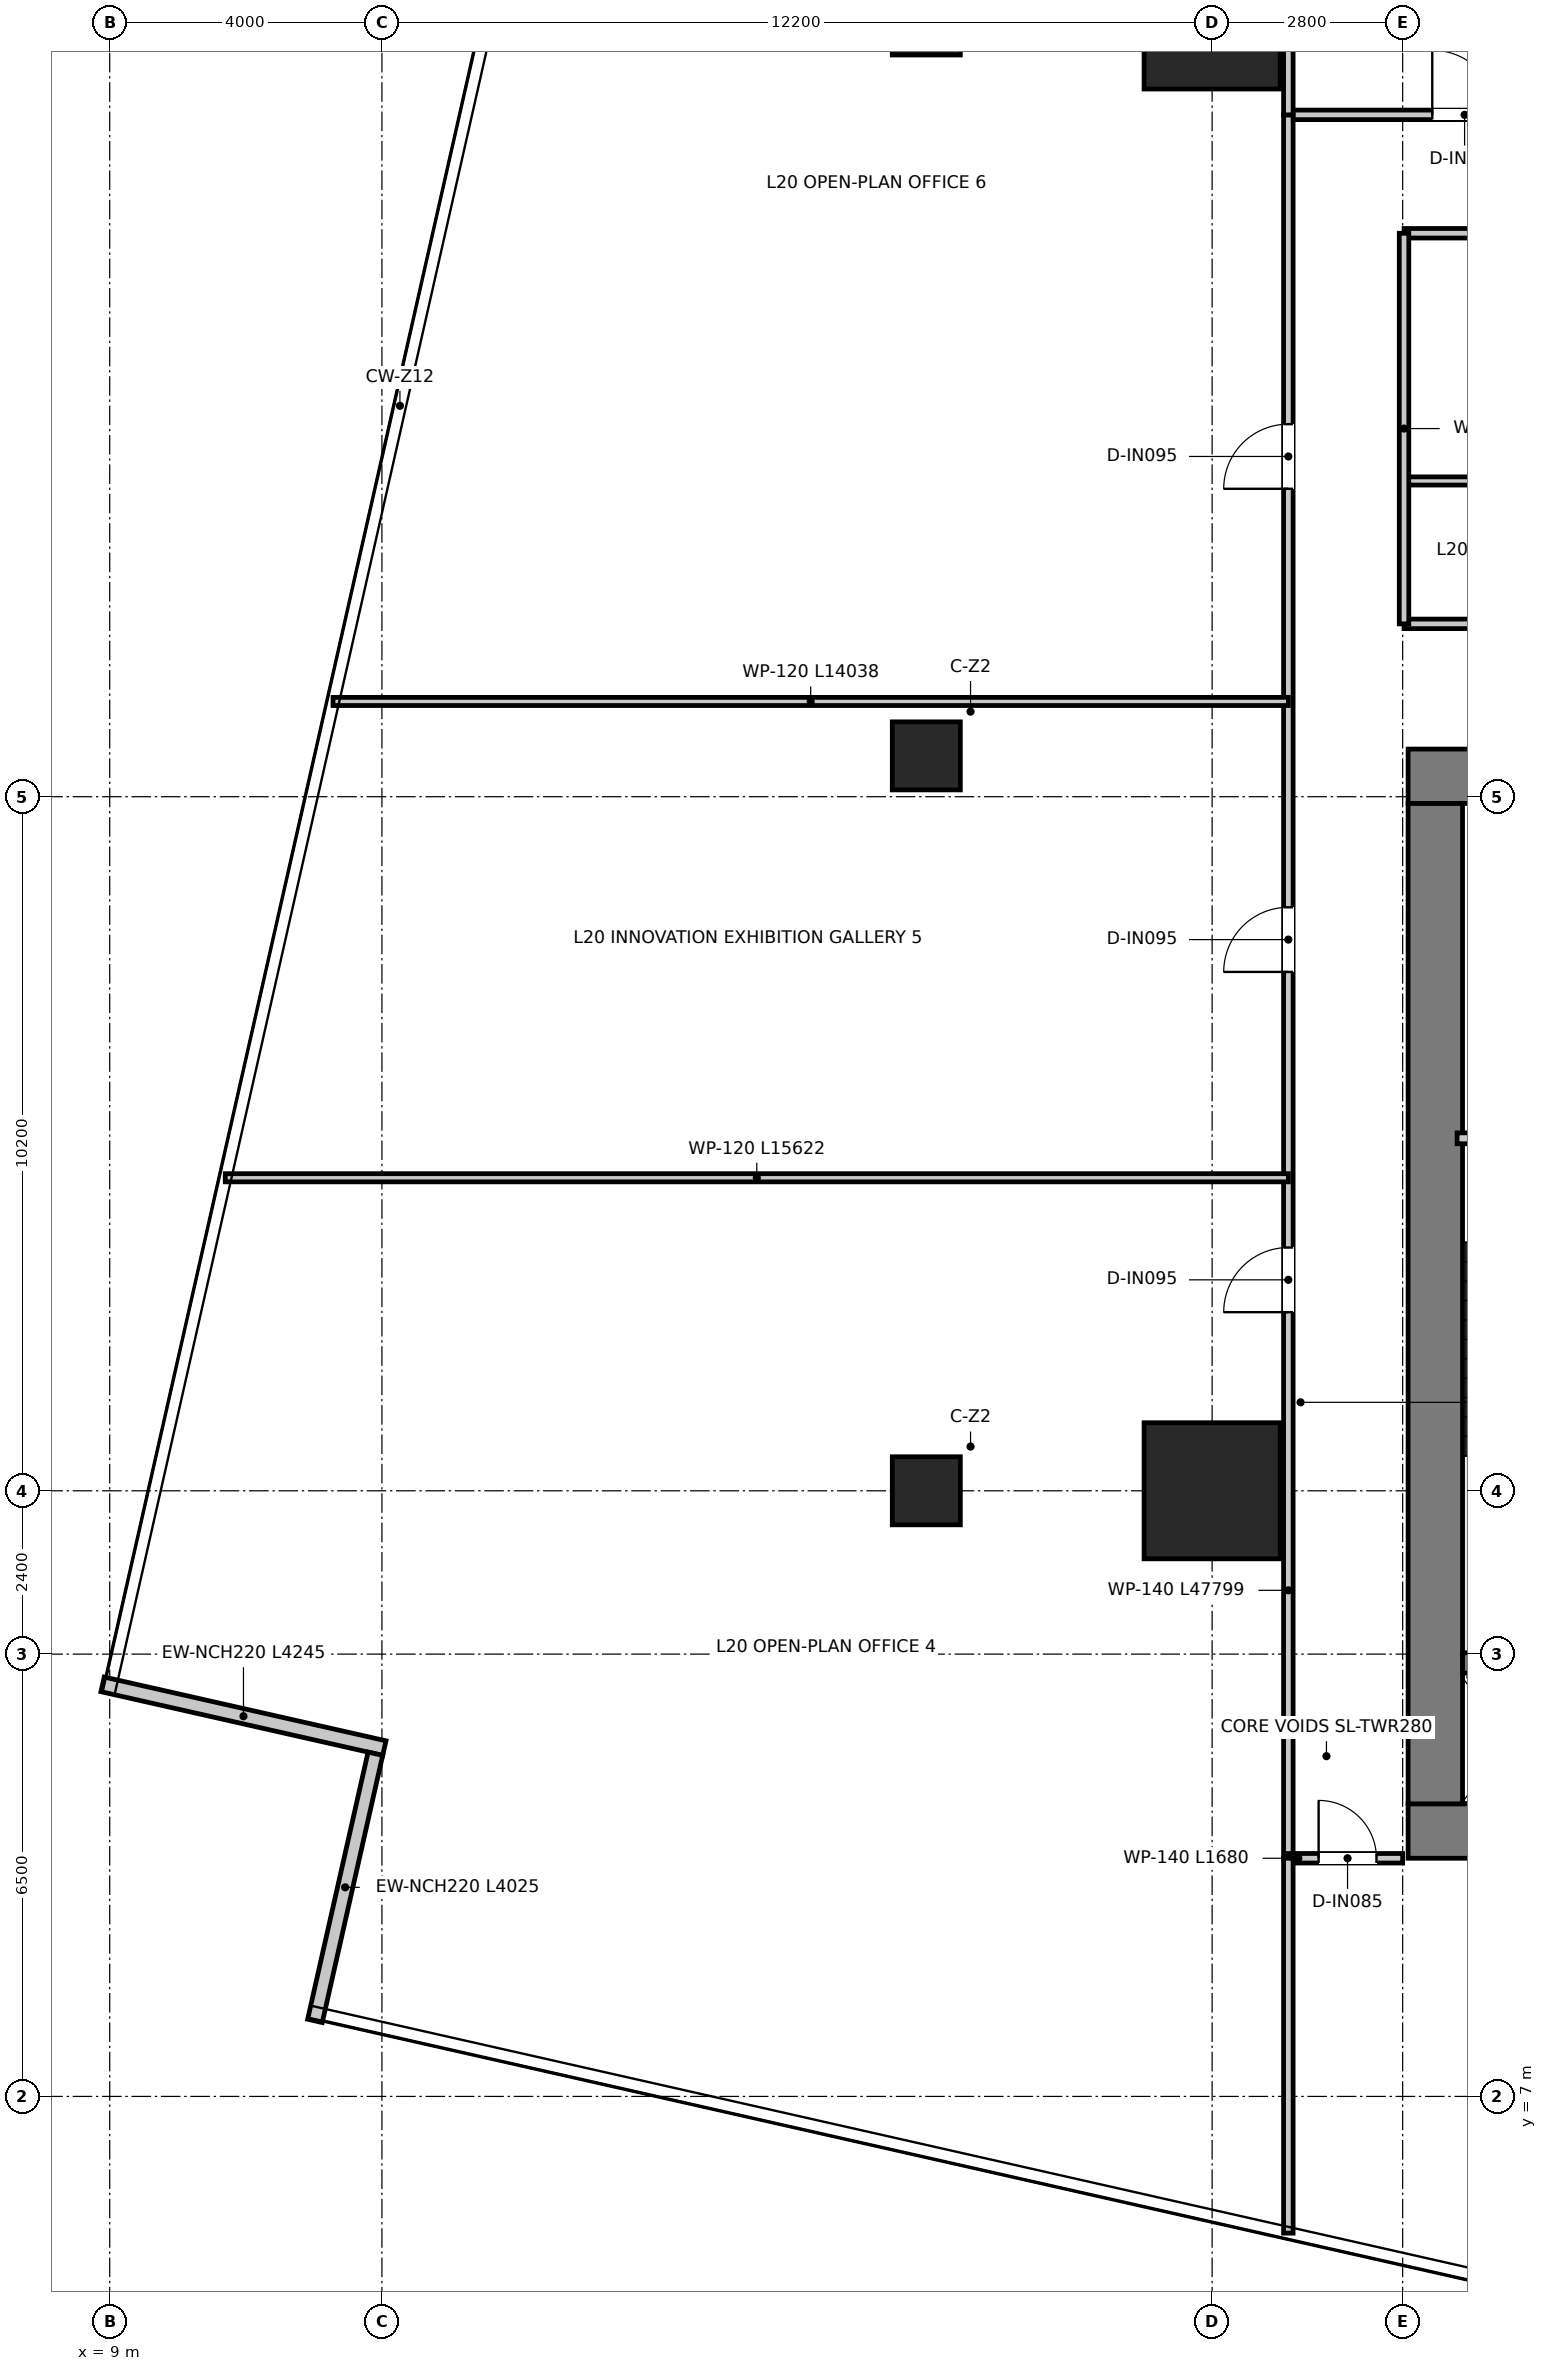
"""IFC4 building model, lengths in metres.
Left out: names, types, materials, properties, quantities, classifications, styles, units other than length and angle.
Written with IfcOpenShell. Run it as: python <this file> out.ifc"""

import sys

from ifc_helpers import new_model, si_unit, direction, frame, frame_2d, origin, origin_2d, place, context, subcontext, project, spatial, rectangle, extrude, source, transform, mapped, element, fill, save


model = new_model("IFC4")
c1 = context("Model", 3, precision=1e-05, world=origin(), true_north=direction((0.0, 1.0)))
c2 = subcontext(c1, "Body", "Model", "MODEL_VIEW")
j1 = project(units=[si_unit("LENGTHUNIT", "METRE"), si_unit("PLANEANGLEUNIT", "RADIAN")], contexts=[c1])
p1 = place(None, origin())
s1 = spatial("IfcSite", under=j1, at=p1, CompositionType="ELEMENT")
p2 = place(p1, origin())
s2 = spatial("IfcBuilding", under=s1, at=p2, CompositionType="ELEMENT")
p3 = place(p2, frame((0.0, 0.0, 86.1)))
s3 = spatial("IfcBuildingStorey", under=s2, at=p3, CompositionType="ELEMENT", Elevation=86.1)
p4 = place(p3, frame((28.08, 10.9, 0.0), z_axis=(0.0, 0.0, 1.0), x_axis=(1.0, 0.0, 0.0)))
e1 = element("IfcWall", 1, at=p4, inside=s3, PredefinedType="SHEAR", context=c2, shape_type="SweptSolid", body=[
    extrude(rectangle(XDim=15.84, YDim=0.8, at=frame_2d((7.92, 0.0))), origin(), (0.0, 0.0, 1.0), 3.95),
])
p5 = place(p3, frame((28.08, 26.4, 0.0), z_axis=(0.0, 0.0, 1.0), x_axis=(1.0, 0.0, 0.0)))
e2 = element("IfcWall", 2, at=p5, inside=s3, PredefinedType="SHEAR", context=c2, shape_type="SweptSolid", body=[
    extrude(rectangle(XDim=15.84, YDim=0.8, at=frame_2d((7.92, 0.0))), origin(), (0.0, 0.0, 1.0), 3.95),
])
p6 = place(p5, frame((7.22, 0.0, 0.0)))
e3 = element("IfcOpeningElement", 3, at=p6, cuts=e2, PredefinedType="OPENING", context=c2, shape_type="SweptSolid", body=[
    extrude(rectangle(XDim=1.4, YDim=2.2, at=frame_2d((0.7, 1.1))), frame((0.0, 0.41, 0.0), z_axis=(0.0, -1.0, 0.0), x_axis=(1.0, 0.0, 0.0)), (0.0, 0.0, 1.0), 0.82),
])
p7 = place(p5, frame((1.775, 0.0, 0.0)))
e4 = element("IfcOpeningElement", 4, at=p7, cuts=e2, PredefinedType="OPENING", context=c2, shape_type="SweptSolid", body=[
    extrude(rectangle(XDim=1.05, YDim=2.1, at=frame_2d((0.525, 1.05))), frame((0.0, 0.41, 0.0), z_axis=(0.0, -1.0, 0.0), x_axis=(1.0, 0.0, 0.0)), (0.0, 0.0, 1.0), 0.82),
])
p8 = place(p5, frame((13.015, 0.0, 0.0)))
e5 = element("IfcOpeningElement", 5, at=p8, cuts=e2, PredefinedType="OPENING", context=c2, shape_type="SweptSolid", body=[
    extrude(rectangle(XDim=1.05, YDim=2.1, at=frame_2d((0.525, 1.05))), frame((0.0, 0.41, 0.0), z_axis=(0.0, -1.0, 0.0), x_axis=(1.0, 0.0, 0.0)), (0.0, 0.0, 1.0), 0.82),
])
p9 = place(p3, frame((28.48, 11.3, 0.0), z_axis=(0.0, 0.0, 1.0), x_axis=(0.0, 1.0, 0.0)))
e6 = element("IfcWall", 6, at=p9, inside=s3, PredefinedType="SHEAR", context=c2, shape_type="SweptSolid", body=[
    extrude(rectangle(XDim=14.7, YDim=0.8, at=frame_2d((7.35, 0.0))), origin(), (0.0, 0.0, 1.0), 3.95),
])
p10 = place(p3, frame((28.88, 13.37, 0.0), z_axis=(0.0, 0.0, 1.0), x_axis=(1.0, 0.0, 0.0)))
e7 = element("IfcWall", 7, at=p10, inside=s3, PredefinedType="SHEAR", context=c2, shape_type="SweptSolid", body=[
    extrude(rectangle(XDim=3.1, YDim=0.3, at=frame_2d((1.55, 0.0))), origin(), (0.0, 0.0, 1.0), 3.95),
])
m1 = source(origin(), c2, "Body", "SweptSolid", [
    extrude(rectangle(XDim=2.0, YDim=2.0, at=origin_2d()), origin(), (0.0, 0.0, 1.0), 3.95),
])
for number, where, z_axis, x_axis in (
    (8, (25.2, 15.9, 0.0), (0.0, 0.0, 1.0), (1.0, 0.0, 0.0)),
    (9, (25.2, 37.5, 0.0), (0.0, 0.0, 1.0), (1.0, 0.0, 0.0)),
):
    element("IfcColumn", number, at=place(p3, frame(where, z_axis=z_axis, x_axis=x_axis)), inside=s3, PredefinedType="USERDEFINED", context=c2, shape_type="MappedRepresentation", body=[
        mapped(m1, transform((0.0, 0.0, 0.0), x_axis=(1.0, 0.0, 0.0), y_axis=(0.0, 1.0, 0.0), z_axis=(0.0, 0.0, 1.0), scale=1.0)),
    ])
m2 = source(origin(), c2, "Body", "SweptSolid", [
    extrude(rectangle(XDim=1.0, YDim=1.0, at=origin_2d()), origin(), (0.0, 0.0, 1.0), 3.95),
])
for number, where, z_axis, x_axis in (
    (10, (21.0, 15.9, 0.0), (0.0, 0.0, 1.0), (1.0, 0.0, 0.0)),
    (11, (21.0, 26.7, 0.0), (0.0, 0.0, 1.0), (1.0, 0.0, 0.0)),
    (12, (21.0, 37.5, 0.0), (0.0, 0.0, 1.0), (1.0, 0.0, 0.0)),
):
    element("IfcColumn", number, at=place(p3, frame(where, z_axis=z_axis, x_axis=x_axis)), inside=s3, PredefinedType="COLUMN", context=c2, shape_type="MappedRepresentation", body=[
        mapped(m2, transform((0.0, 0.0, 0.0), x_axis=(1.0, 0.0, 0.0), y_axis=(0.0, 1.0, 0.0), z_axis=(0.0, 0.0, 1.0), scale=1.0)),
    ])
p11 = place(p3, frame((8.895, 13.055, 0.0), z_axis=(0.0, 0.0, 1.0), x_axis=(0.975347642517, -0.220673913812, 0.0)))
e13 = element("IfcWall", 13, at=p11, inside=s3, PredefinedType="ELEMENTEDWALL", context=c2, shape_type="SweptSolid", body=[
    extrude(rectangle(XDim=4.245, YDim=0.22, at=frame_2d((2.123, 0.0))), origin(), (0.0, 0.0, 1.0), 3.67),
])
p12 = place(p3, frame((12.904, 12.036, 0.0), z_axis=(0.0, 0.0, 1.0), x_axis=(-0.2206667074, -0.975349272951, 0.0)))
e14 = element("IfcWall", 14, at=p12, inside=s3, PredefinedType="ELEMENTEDWALL", context=c2, shape_type="SweptSolid", body=[
    extrude(rectangle(XDim=4.025, YDim=0.22, at=frame_2d((2.012, 0.0))), origin(), (0.0, 0.0, 1.0), 3.67),
])
p13 = place(p3, frame((28.8, 21.08, 0.0), z_axis=(0.0, 0.0, 1.0), x_axis=(1.0, 0.0, 0.0)))
e15 = element("IfcWall", 15, at=p13, inside=s3, PredefinedType="PARTITIONING", context=c2, shape_type="SweptSolid", body=[
    extrude(rectangle(XDim=3.16, YDim=0.16, at=frame_2d((1.58, 0.0))), origin(), (0.0, 0.0, 1.0), 3.67),
])
p14 = place(p13, frame((1.055, 0.0, 0.0)))
e16 = element("IfcOpeningElement", 16, at=p14, cuts=e15, PredefinedType="OPENING", context=c2, shape_type="SweptSolid", body=[
    extrude(rectangle(XDim=1.05, YDim=2.1, at=frame_2d((0.525, 1.05))), frame((0.0, 0.09, 0.0), z_axis=(0.0, -1.0, 0.0), x_axis=(1.0, 0.0, 0.0)), (0.0, 0.0, 1.0), 0.18),
])
p15 = place(p3, frame((28.02, 28.64, 0.0), z_axis=(0.0, 0.0, 1.0), x_axis=(1.0, 0.0, 0.0)))
e17 = element("IfcWall", 17, at=p15, inside=s3, PredefinedType="PARTITIONING", context=c2, shape_type="SweptSolid", body=[
    extrude(rectangle(XDim=15.96, YDim=0.14, at=frame_2d((7.98, 0.0))), origin(), (0.0, 0.0, 1.0), 3.08),
])
p16 = place(p15, frame((7.455, 0.0, 0.0)))
e18 = element("IfcOpeningElement", 18, at=p16, cuts=e17, PredefinedType="OPENING", context=c2, shape_type="SweptSolid", body=[
    extrude(rectangle(XDim=1.05, YDim=2.15, at=frame_2d((0.525, 1.075))), frame((0.0, 0.08, 0.0), z_axis=(0.0, -1.0, 0.0), x_axis=(1.0, 0.0, 0.0)), (0.0, 0.0, 1.0), 0.16),
])
p17 = place(p3, frame((28.02, 30.74, 0.0), z_axis=(0.0, 0.0, 1.0), x_axis=(1.0, 0.0, 0.0)))
e19 = element("IfcWall", 19, at=p17, inside=s3, PredefinedType="PARTITIONING", context=c2, shape_type="SweptSolid", body=[
    extrude(rectangle(XDim=15.96, YDim=0.12, at=frame_2d((7.98, 0.0))), origin(), (0.0, 0.0, 1.0), 3.08),
])
p18 = place(p3, frame((28.02, 34.38, 0.0), z_axis=(0.0, 0.0, 1.0), x_axis=(1.0, 0.0, 0.0)))
e20 = element("IfcWall", 20, at=p18, inside=s3, PredefinedType="PARTITIONING", context=c2, shape_type="SweptSolid", body=[
    extrude(rectangle(XDim=15.96, YDim=0.14, at=frame_2d((7.98, 0.0))), origin(), (0.0, 0.0, 1.0), 3.08),
])
p19 = place(p18, frame((7.83, 0.0, 0.0)))
e21 = element("IfcOpeningElement", 21, at=p19, cuts=e20, PredefinedType="OPENING", context=c2, shape_type="SweptSolid", body=[
    extrude(rectangle(XDim=0.9, YDim=2.1, at=frame_2d((0.45, 1.05))), frame((0.0, 0.08, 0.0), z_axis=(0.0, -1.0, 0.0), x_axis=(1.0, 0.0, 0.0)), (0.0, 0.0, 1.0), 0.16),
])
p20 = place(p18, frame((11.03, 0.0, 0.0)))
e22 = element("IfcOpeningElement", 22, at=p20, cuts=e20, PredefinedType="OPENING", context=c2, shape_type="SweptSolid", body=[
    extrude(rectangle(XDim=0.9, YDim=2.1, at=frame_2d((0.45, 1.05))), frame((0.0, 0.08, 0.0), z_axis=(0.0, -1.0, 0.0), x_axis=(1.0, 0.0, 0.0)), (0.0, 0.0, 1.0), 0.16),
])
p21 = place(p18, frame((14.055, 0.0, 0.0)))
e23 = element("IfcOpeningElement", 23, at=p21, cuts=e20, PredefinedType="OPENING", context=c2, shape_type="SweptSolid", body=[
    extrude(rectangle(XDim=0.95, YDim=2.1, at=frame_2d((0.475, 1.05))), frame((0.0, 0.08, 0.0), z_axis=(0.0, -1.0, 0.0), x_axis=(1.0, 0.0, 0.0)), (0.0, 0.0, 1.0), 0.16),
])
p22 = place(p18, frame((2.855, 0.0, 0.0)))
e24 = element("IfcOpeningElement", 24, at=p22, cuts=e20, PredefinedType="OPENING", context=c2, shape_type="SweptSolid", body=[
    extrude(rectangle(XDim=0.95, YDim=2.1, at=frame_2d((0.475, 1.05))), frame((0.0, 0.08, 0.0), z_axis=(0.0, -1.0, 0.0), x_axis=(1.0, 0.0, 0.0)), (0.0, 0.0, 1.0), 0.16),
])
p23 = place(p3, frame((28.02, 28.64, 0.0), z_axis=(0.0, 0.0, 1.0), x_axis=(0.0, 1.0, 0.0)))
e25 = element("IfcWall", 25, at=p23, inside=s3, PredefinedType="PARTITIONING", context=c2, shape_type="SweptSolid", body=[
    extrude(rectangle(XDim=5.74, YDim=0.14, at=frame_2d((2.87, 0.0))), origin(), (0.0, 0.0, 1.0), 3.27),
])
p24 = place(p3, frame((26.32, 36.12, 0.0), z_axis=(0.0, 0.0, 1.0), x_axis=(1.0, 0.0, 0.0)))
e26 = element("IfcWall", 26, at=p24, inside=s3, PredefinedType="PARTITIONING", context=c2, shape_type="SweptSolid", body=[
    extrude(rectangle(XDim=19.36, YDim=0.14, at=frame_2d((9.68, 0.0))), origin(), (0.0, 0.0, 1.0), 3.08),
])
p25 = place(p24, frame((2.115, 0.0, 0.0)))
e27 = element("IfcOpeningElement", 27, at=p25, cuts=e26, PredefinedType="OPENING", context=c2, shape_type="SweptSolid", body=[
    extrude(rectangle(XDim=0.95, YDim=2.1, at=frame_2d((0.475, 1.05))), frame((0.0, 0.08, 0.0), z_axis=(0.0, -1.0, 0.0), x_axis=(1.0, 0.0, 0.0)), (0.0, 0.0, 1.0), 0.16),
])
p26 = place(p24, frame((8.705, 0.0, 0.0)))
e28 = element("IfcOpeningElement", 28, at=p26, cuts=e26, PredefinedType="OPENING", context=c2, shape_type="SweptSolid", body=[
    extrude(rectangle(XDim=0.95, YDim=2.1, at=frame_2d((0.475, 1.05))), frame((0.0, 0.08, 0.0), z_axis=(0.0, -1.0, 0.0), x_axis=(1.0, 0.0, 0.0)), (0.0, 0.0, 1.0), 0.16),
])
p27 = place(p24, frame((15.795, 0.0, 0.0)))
e29 = element("IfcOpeningElement", 29, at=p27, cuts=e26, PredefinedType="OPENING", context=c2, shape_type="SweptSolid", body=[
    extrude(rectangle(XDim=0.95, YDim=2.1, at=frame_2d((0.475, 1.05))), frame((0.0, 0.08, 0.0), z_axis=(0.0, -1.0, 0.0), x_axis=(1.0, 0.0, 0.0)), (0.0, 0.0, 1.0), 0.16),
])
p28 = place(p3, frame((26.32, 10.5, 0.0), z_axis=(0.0, 0.0, 1.0), x_axis=(0.0, 1.0, 0.0)))
e30 = element("IfcWall", 30, at=p28, inside=s3, PredefinedType="PARTITIONING", context=c2, shape_type="SweptSolid", body=[
    extrude(rectangle(XDim=25.62, YDim=0.14, at=frame_2d((12.81, 0.0))), origin(), (0.0, 0.0, 1.0), 2.97),
])
p29 = place(p28, frame((8.025, 0.0, 0.0)))
e31 = element("IfcOpeningElement", 31, at=p29, cuts=e30, PredefinedType="OPENING", context=c2, shape_type="SweptSolid", body=[
    extrude(rectangle(XDim=0.95, YDim=2.1, at=frame_2d((0.475, 1.05))), frame((0.0, 0.08, 0.0), z_axis=(0.0, -1.0, 0.0), x_axis=(1.0, 0.0, 0.0)), (0.0, 0.0, 1.0), 0.16),
])
p30 = place(p28, frame((13.025, 0.0, 0.0)))
e32 = element("IfcOpeningElement", 32, at=p30, cuts=e30, PredefinedType="OPENING", context=c2, shape_type="SweptSolid", body=[
    extrude(rectangle(XDim=0.95, YDim=2.1, at=frame_2d((0.475, 1.05))), frame((0.0, 0.08, 0.0), z_axis=(0.0, -1.0, 0.0), x_axis=(1.0, 0.0, 0.0)), (0.0, 0.0, 1.0), 0.16),
])
p31 = place(p28, frame((20.125, 0.0, 0.0)))
e33 = element("IfcOpeningElement", 33, at=p31, cuts=e30, PredefinedType="OPENING", context=c2, shape_type="SweptSolid", body=[
    extrude(rectangle(XDim=0.95, YDim=2.1, at=frame_2d((0.475, 1.05))), frame((0.0, 0.08, 0.0), z_axis=(0.0, -1.0, 0.0), x_axis=(1.0, 0.0, 0.0)), (0.0, 0.0, 1.0), 0.16),
])
p32 = place(p3, frame((26.32, 10.5, 0.0), z_axis=(0.0, 0.0, 1.0), x_axis=(1.0, 0.0, 0.0)))
e34 = element("IfcWall", 34, at=p32, inside=s3, PredefinedType="PARTITIONING", context=c2, shape_type="SweptSolid", body=[
    extrude(rectangle(XDim=1.68, YDim=0.14, at=frame_2d((0.84, 0.0))), origin(), (0.0, 0.0, 1.0), 3.67),
])
p33 = place(p32, frame((0.445, 0.0, 0.0)))
e35 = element("IfcOpeningElement", 35, at=p33, cuts=e34, PredefinedType="OPENING", context=c2, shape_type="SweptSolid", body=[
    extrude(rectangle(XDim=0.85, YDim=2.1, at=frame_2d((0.425, 1.05))), frame((0.0, 0.08, 0.0), z_axis=(0.0, -1.0, 0.0), x_axis=(1.0, 0.0, 0.0)), (0.0, 0.0, 1.0), 0.16),
])
p34 = place(p3, frame((26.32, 36.12, 0.0), z_axis=(0.0, 0.0, 1.0), x_axis=(0.0, 1.0, 0.0)))
e36 = element("IfcWall", 36, at=p34, inside=s3, PredefinedType="PARTITIONING", context=c2, shape_type="SweptSolid", body=[
    extrude(rectangle(XDim=16.67, YDim=0.14, at=frame_2d((8.335, 0.0))), origin(), (0.0, 0.0, 1.0), 2.97),
])
p35 = place(p3, frame((26.32, 4.991, 0.0), z_axis=(0.0, 0.0, 1.0), x_axis=(0.0, 1.0, 0.0)))
e37 = element("IfcWall", 37, at=p35, inside=s3, PredefinedType="PARTITIONING", context=c2, shape_type="SweptSolid", body=[
    extrude(rectangle(XDim=5.509, YDim=0.14, at=frame_2d((2.754, 0.0))), origin(), (0.0, 0.0, 1.0), 3.67),
])
p36 = place(p3, frame((10.698, 20.5, 0.0), z_axis=(0.0, 0.0, 1.0), x_axis=(1.0, 0.0, 0.0)))
e38 = element("IfcWall", 38, at=p36, inside=s3, PredefinedType="PARTITIONING", context=c2, shape_type="SweptSolid", body=[
    extrude(rectangle(XDim=15.622, YDim=0.12, at=frame_2d((7.811, 0.0))), origin(), (0.0, 0.0, 1.0), 2.97),
])
p37 = place(p3, frame((12.282, 27.5, 0.0), z_axis=(0.0, 0.0, 1.0), x_axis=(1.0, 0.0, 0.0)))
e39 = element("IfcWall", 39, at=p37, inside=s3, PredefinedType="PARTITIONING", context=c2, shape_type="SweptSolid", body=[
    extrude(rectangle(XDim=14.038, YDim=0.12, at=frame_2d((7.019, 0.0))), origin(), (0.0, 0.0, 1.0), 2.97),
])
p38 = place(p25, origin())
e40 = element("IfcDoor", 40, at=p38, inside=s3, OperationType="SINGLE_SWING_LEFT", PredefinedType="DOOR", context=c2, shape_type="SweptSolid", body=[
    extrude(rectangle(XDim=0.95, YDim=2.1, at=frame_2d((0.475, 1.05))), frame((0.0, 0.025, 0.0), z_axis=(0.0, -1.0, 0.0), x_axis=(1.0, 0.0, 0.0)), (0.0, 0.0, 1.0), 0.05),
])
fill(e27, e40)
p39 = place(p29, origin())
e41 = element("IfcDoor", 41, at=p39, inside=s3, OperationType="SINGLE_SWING_LEFT", PredefinedType="DOOR", context=c2, shape_type="SweptSolid", body=[
    extrude(rectangle(XDim=0.95, YDim=2.1, at=frame_2d((0.475, 1.05))), frame((0.0, 0.025, 0.0), z_axis=(0.0, -1.0, 0.0), x_axis=(1.0, 0.0, 0.0)), (0.0, 0.0, 1.0), 0.05),
])
fill(e31, e41)
p40 = place(p30, origin())
e42 = element("IfcDoor", 42, at=p40, inside=s3, OperationType="SINGLE_SWING_LEFT", PredefinedType="DOOR", context=c2, shape_type="SweptSolid", body=[
    extrude(rectangle(XDim=0.95, YDim=2.1, at=frame_2d((0.475, 1.05))), frame((0.0, 0.025, 0.0), z_axis=(0.0, -1.0, 0.0), x_axis=(1.0, 0.0, 0.0)), (0.0, 0.0, 1.0), 0.05),
])
fill(e32, e42)
p41 = place(p31, origin())
e43 = element("IfcDoor", 43, at=p41, inside=s3, OperationType="SINGLE_SWING_LEFT", PredefinedType="DOOR", context=c2, shape_type="SweptSolid", body=[
    extrude(rectangle(XDim=0.95, YDim=2.1, at=frame_2d((0.475, 1.05))), frame((0.0, 0.025, 0.0), z_axis=(0.0, -1.0, 0.0), x_axis=(1.0, 0.0, 0.0)), (0.0, 0.0, 1.0), 0.05),
])
fill(e33, e43)
p42 = place(p33, origin())
e44 = element("IfcDoor", 44, at=p42, inside=s3, OperationType="SINGLE_SWING_LEFT", PredefinedType="DOOR", context=c2, shape_type="SweptSolid", body=[
    extrude(rectangle(XDim=0.85, YDim=2.1, at=frame_2d((0.425, 1.05))), frame((0.0, 0.025, 0.0), z_axis=(0.0, -1.0, 0.0), x_axis=(1.0, 0.0, 0.0)), (0.0, 0.0, 1.0), 0.05),
])
fill(e35, e44)
save(model, sys.argv[1])
